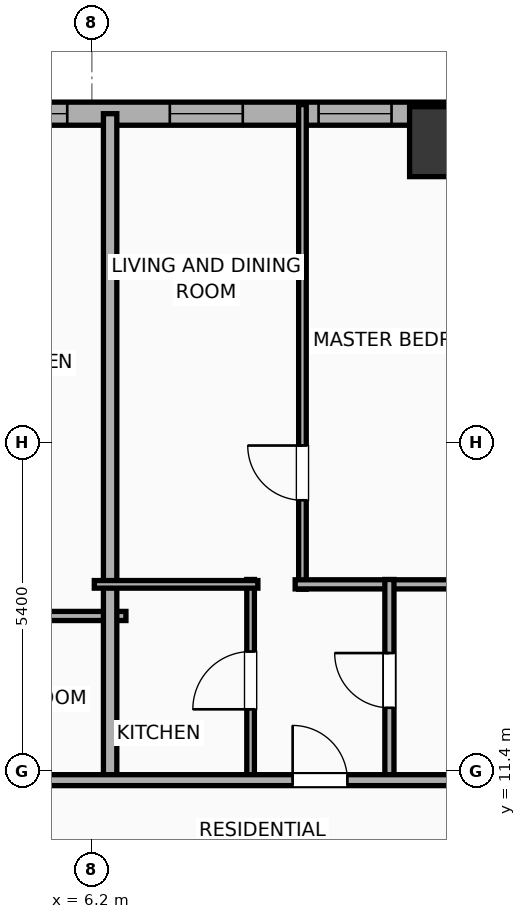
"""IFC4 building model, lengths in metres.
Left out: names, types, materials, properties, quantities, classifications, styles, units other than length and angle.
Written with IfcOpenShell. Run it as: python <this file> out.ifc"""

import sys

from ifc_helpers import new_model, si_unit, direction, frame, frame_2d, origin, origin_2d, place, context, subcontext, project, spatial, rectangle, hollow_rectangle, extrude, element, fill, save


model = new_model("IFC4")
c1 = context("Model", 3, precision=1e-05, world=origin(), true_north=direction((0.0, 1.0)))
c2 = subcontext(c1, "Body", "Model", "MODEL_VIEW")
j1 = project(units=[si_unit("LENGTHUNIT", "METRE"), si_unit("PLANEANGLEUNIT", "RADIAN")], contexts=[c1])
p1 = place(None, origin())
s1 = spatial("IfcSite", under=j1, at=p1, CompositionType="ELEMENT")
p2 = place(p1, origin())
s2 = spatial("IfcBuilding", under=s1, at=p2, CompositionType="ELEMENT")
p3 = place(p2, frame((0.0, 0.0, 76.7)))
s3 = spatial("IfcBuildingStorey", under=s2, at=p3, CompositionType="ELEMENT", Elevation=76.7)
p4 = place(p3, frame((12.0, 21.75, 0.0), z_axis=(0.0, 0.0, 1.0), x_axis=(1.0, 0.0, 0.0)))
e1 = element("IfcColumn", 1, at=p4, inside=s3, PredefinedType="COLUMN", context=c2, shape_type="SweptSolid", body=[
    extrude(hollow_rectangle(XDim=1.15, YDim=1.15, WallThickness=0.04, at=origin_2d()), origin(), (0.0, 0.0, 1.0), 3.9),
])
p5 = place(p3, frame((-29.581, 22.21, 0.0), z_axis=(0.0, 0.0, 1.0), x_axis=(1.0, 0.0, 0.0)))
e2 = element("IfcWall", 2, at=p5, inside=s3, PredefinedType="ELEMENTEDWALL", context=c2, shape_type="SweptSolid", body=[
    extrude(rectangle(XDim=51.963, YDim=0.38, at=frame_2d((25.981, 0.0))), origin(), (0.0, 0.0, 1.0), 3.6),
])
p6 = place(p5, frame((25.631, 0.0, 0.75)))
e3 = element("IfcOpeningElement", 3, at=p6, cuts=e2, PredefinedType="OPENING", context=c2, shape_type="SweptSolid", body=[
    extrude(rectangle(XDim=2.4, YDim=2.1, at=frame_2d((1.2, 1.05))), frame((0.0, 0.2, 0.0), z_axis=(0.0, -1.0, 0.0), x_axis=(1.0, 0.0, 0.0)), (0.0, 0.0, 1.0), 0.4),
])
p7 = place(p5, frame((42.952, 0.0, 0.75)))
e4 = element("IfcOpeningElement", 4, at=p7, cuts=e2, PredefinedType="OPENING", context=c2, shape_type="SweptSolid", body=[
    extrude(rectangle(XDim=2.4, YDim=2.1, at=frame_2d((1.2, 1.05))), frame((0.0, 0.2, 0.0), z_axis=(0.0, -1.0, 0.0), x_axis=(1.0, 0.0, 0.0)), (0.0, 0.0, 1.0), 0.4),
])
p8 = place(p5, frame((1.406, 0.0, 0.75)))
e5 = element("IfcOpeningElement", 5, at=p8, cuts=e2, PredefinedType="OPENING", context=c2, shape_type="SweptSolid", body=[
    extrude(rectangle(XDim=1.2, YDim=2.05, at=frame_2d((0.6, 1.025))), frame((0.0, 0.2, 0.0), z_axis=(0.0, -1.0, 0.0), x_axis=(1.0, 0.0, 0.0)), (0.0, 0.0, 1.0), 0.4),
])
p9 = place(p5, frame((4.297, 0.0, 0.75)))
e6 = element("IfcOpeningElement", 6, at=p9, cuts=e2, PredefinedType="OPENING", context=c2, shape_type="SweptSolid", body=[
    extrude(rectangle(XDim=1.2, YDim=2.05, at=frame_2d((0.6, 1.025))), frame((0.0, 0.2, 0.0), z_axis=(0.0, -1.0, 0.0), x_axis=(1.0, 0.0, 0.0)), (0.0, 0.0, 1.0), 0.4),
])
p10 = place(p5, frame((7.776, 0.0, 0.75)))
e7 = element("IfcOpeningElement", 7, at=p10, cuts=e2, PredefinedType="OPENING", context=c2, shape_type="SweptSolid", body=[
    extrude(rectangle(XDim=1.2, YDim=2.05, at=frame_2d((0.6, 1.025))), frame((0.0, 0.2, 0.0), z_axis=(0.0, -1.0, 0.0), x_axis=(1.0, 0.0, 0.0)), (0.0, 0.0, 1.0), 0.4),
])
p11 = place(p5, frame((14.036, 0.0, 0.75)))
e8 = element("IfcOpeningElement", 8, at=p11, cuts=e2, PredefinedType="OPENING", context=c2, shape_type="SweptSolid", body=[
    extrude(rectangle(XDim=1.2, YDim=2.05, at=frame_2d((0.6, 1.025))), frame((0.0, 0.2, 0.0), z_axis=(0.0, -1.0, 0.0), x_axis=(1.0, 0.0, 0.0)), (0.0, 0.0, 1.0), 0.4),
])
p12 = place(p5, frame((11.146, 0.0, 0.75)))
e9 = element("IfcOpeningElement", 9, at=p12, cuts=e2, PredefinedType="OPENING", context=c2, shape_type="SweptSolid", body=[
    extrude(rectangle(XDim=1.2, YDim=2.05, at=frame_2d((0.6, 1.025))), frame((0.0, 0.2, 0.0), z_axis=(0.0, -1.0, 0.0), x_axis=(1.0, 0.0, 0.0)), (0.0, 0.0, 1.0), 0.4),
])
p13 = place(p5, frame((18.751, 0.0, 0.75)))
e10 = element("IfcOpeningElement", 10, at=p13, cuts=e2, PredefinedType="OPENING", context=c2, shape_type="SweptSolid", body=[
    extrude(rectangle(XDim=1.2, YDim=2.05, at=frame_2d((0.6, 1.025))), frame((0.0, 0.2, 0.0), z_axis=(0.0, -1.0, 0.0), x_axis=(1.0, 0.0, 0.0)), (0.0, 0.0, 1.0), 0.4),
])
p14 = place(p5, frame((23.647, 0.0, 0.75)))
e11 = element("IfcOpeningElement", 11, at=p14, cuts=e2, PredefinedType="OPENING", context=c2, shape_type="SweptSolid", body=[
    extrude(rectangle(XDim=1.2, YDim=2.05, at=frame_2d((0.6, 1.025))), frame((0.0, 0.2, 0.0), z_axis=(0.0, -1.0, 0.0), x_axis=(1.0, 0.0, 0.0)), (0.0, 0.0, 1.0), 0.4),
])
p15 = place(p5, frame((32.006, 0.0, 0.75)))
e12 = element("IfcOpeningElement", 12, at=p15, cuts=e2, PredefinedType="OPENING", context=c2, shape_type="SweptSolid", body=[
    extrude(rectangle(XDim=1.2, YDim=2.05, at=frame_2d((0.6, 1.025))), frame((0.0, 0.2, 0.0), z_axis=(0.0, -1.0, 0.0), x_axis=(1.0, 0.0, 0.0)), (0.0, 0.0, 1.0), 0.4),
])
p16 = place(p5, frame((34.176, 0.0, 0.75)))
e13 = element("IfcOpeningElement", 13, at=p16, cuts=e2, PredefinedType="OPENING", context=c2, shape_type="SweptSolid", body=[
    extrude(rectangle(XDim=1.2, YDim=2.05, at=frame_2d((0.6, 1.025))), frame((0.0, 0.2, 0.0), z_axis=(0.0, -1.0, 0.0), x_axis=(1.0, 0.0, 0.0)), (0.0, 0.0, 1.0), 0.4),
])
p17 = place(p5, frame((37.063, 0.0, 0.75)))
e14 = element("IfcOpeningElement", 14, at=p17, cuts=e2, PredefinedType="OPENING", context=c2, shape_type="SweptSolid", body=[
    extrude(rectangle(XDim=1.2, YDim=2.05, at=frame_2d((0.6, 1.025))), frame((0.0, 0.2, 0.0), z_axis=(0.0, -1.0, 0.0), x_axis=(1.0, 0.0, 0.0)), (0.0, 0.0, 1.0), 0.4),
])
p18 = place(p5, frame((39.509, 0.0, 0.75)))
e15 = element("IfcOpeningElement", 15, at=p18, cuts=e2, PredefinedType="OPENING", context=c2, shape_type="SweptSolid", body=[
    extrude(rectangle(XDim=1.2, YDim=2.05, at=frame_2d((0.6, 1.025))), frame((0.0, 0.2, 0.0), z_axis=(0.0, -1.0, 0.0), x_axis=(1.0, 0.0, 0.0)), (0.0, 0.0, 1.0), 0.4),
])
p19 = place(p5, frame((46.921, 0.0, 0.75)))
e16 = element("IfcOpeningElement", 16, at=p19, cuts=e2, PredefinedType="OPENING", context=c2, shape_type="SweptSolid", body=[
    extrude(rectangle(XDim=1.2, YDim=2.05, at=frame_2d((0.6, 1.025))), frame((0.0, 0.2, 0.0), z_axis=(0.0, -1.0, 0.0), x_axis=(1.0, 0.0, 0.0)), (0.0, 0.0, 1.0), 0.4),
])
p20 = place(p5, frame((49.55, 0.0, 0.75)))
e17 = element("IfcOpeningElement", 17, at=p20, cuts=e2, PredefinedType="OPENING", context=c2, shape_type="SweptSolid", body=[
    extrude(rectangle(XDim=1.2, YDim=2.05, at=frame_2d((0.6, 1.025))), frame((0.0, 0.2, 0.0), z_axis=(0.0, -1.0, 0.0), x_axis=(1.0, 0.0, 0.0)), (0.0, 0.0, 1.0), 0.4),
])
p21 = place(p3, frame((3.81, 13.95, 0.0), z_axis=(0.0, 0.0, 1.0), x_axis=(1.0, 0.0, 0.0)))
e18 = element("IfcWall", 18, at=p21, inside=s3, PredefinedType="PLUMBINGWALL", context=c2, shape_type="SweptSolid", body=[
    extrude(rectangle(XDim=2.95, YDim=0.15, at=frame_2d((1.475, 0.0))), origin(), (0.0, 0.0, 1.0), 3.6),
])
p22 = place(p3, frame((6.5, 11.17, 0.0), z_axis=(0.0, 0.0, 1.0), x_axis=(0.0, 1.0, 0.0)))
e19 = element("IfcWall", 19, at=p22, inside=s3, PredefinedType="PARTITIONING", context=c2, shape_type="SweptSolid", body=[
    extrude(rectangle(XDim=11.04, YDim=0.22, at=frame_2d((5.52, 0.0))), origin(), (0.0, 0.0, 1.0), 3.6),
])
p23 = place(p3, frame((9.663, 14.39, 0.0), z_axis=(0.0, 0.0, 1.0), x_axis=(0.0, 1.0, 0.0)))
e20 = element("IfcWall", 20, at=p23, inside=s3, PredefinedType="PARTITIONING", context=c2, shape_type="SweptSolid", body=[
    extrude(rectangle(XDim=7.97, YDim=0.125, at=frame_2d((3.985, 0.0))), origin(), (0.0, 0.0, 1.0), 3.6),
])
p24 = place(p23, frame((1.463, 0.0, 0.0)))
e21 = element("IfcOpeningElement", 21, at=p24, cuts=e20, PredefinedType="OPENING", context=c2, shape_type="SweptSolid", body=[
    extrude(rectangle(XDim=0.9, YDim=2.05, at=frame_2d((0.45, 1.025))), frame((0.0, 0.073, 0.0), z_axis=(0.0, -1.0, 0.0), x_axis=(1.0, 0.0, 0.0)), (0.0, 0.0, 1.0), 0.145),
])
p25 = place(p3, frame((9.543, 14.47, 0.0), z_axis=(0.0, 0.0, 1.0), x_axis=(1.0, 0.0, 0.0)))
e22 = element("IfcWall", 22, at=p25, inside=s3, PredefinedType="PLUMBINGWALL", context=c2, shape_type="SweptSolid", body=[
    extrude(rectangle(XDim=3.605, YDim=0.15, at=frame_2d((1.802, 0.0))), origin(), (0.0, 0.0, 1.0), 3.6),
])
p26 = place(p3, frame((8.81, 11.23, 0.0), z_axis=(0.0, 0.0, 1.0), x_axis=(0.0, 1.0, 0.0)))
e23 = element("IfcWall", 23, at=p26, inside=s3, PredefinedType="PARTITIONING", context=c2, shape_type="SweptSolid", body=[
    extrude(rectangle(XDim=3.32, YDim=0.125, at=frame_2d((1.66, 0.0))), origin(), (0.0, 0.0, 1.0), 3.6),
])
p27 = place(p26, frame((1.185, 0.0, 0.0)))
e24 = element("IfcOpeningElement", 24, at=p27, cuts=e23, PredefinedType="OPENING", context=c2, shape_type="SweptSolid", body=[
    extrude(rectangle(XDim=0.95, YDim=2.05, at=frame_2d((0.475, 1.025))), frame((0.0, 0.073, 0.0), z_axis=(0.0, -1.0, 0.0), x_axis=(1.0, 0.0, 0.0)), (0.0, 0.0, 1.0), 0.145),
])
p28 = place(p3, frame((6.24, 14.47, 0.0), z_axis=(0.0, 0.0, 1.0), x_axis=(1.0, 0.0, 0.0)))
e25 = element("IfcWall", 25, at=p28, inside=s3, PredefinedType="PARTITIONING", context=c2, shape_type="SweptSolid", body=[
    extrude(rectangle(XDim=2.69, YDim=0.125, at=frame_2d((1.345, 0.0))), origin(), (0.0, 0.0, 1.0), 3.6),
])
p29 = place(p3, frame((11.093, 11.23, 0.0), z_axis=(0.0, 0.0, 1.0), x_axis=(0.0, 1.0, 0.0)))
e26 = element("IfcWall", 26, at=p29, inside=s3, PredefinedType="PLUMBINGWALL", context=c2, shape_type="SweptSolid", body=[
    extrude(rectangle(XDim=3.32, YDim=0.15, at=frame_2d((1.66, 0.0))), origin(), (0.0, 0.0, 1.0), 3.6),
])
p30 = place(p29, frame((1.21, 0.0, 0.0)))
e27 = element("IfcOpeningElement", 27, at=p30, cuts=e26, PredefinedType="OPENING", context=c2, shape_type="SweptSolid", body=[
    extrude(rectangle(XDim=0.9, YDim=2.05, at=frame_2d((0.45, 1.025))), frame((0.0, 0.085, 0.0), z_axis=(0.0, -1.0, 0.0), x_axis=(1.0, 0.0, 0.0)), (0.0, 0.0, 1.0), 0.17),
])
p31 = place(p3, frame((-33.41, 11.25, 0.0), z_axis=(0.0, 0.0, 1.0), x_axis=(1.0, 0.0, 0.0)))
e28 = element("IfcWall", 28, at=p31, inside=s3, PredefinedType="PARTITIONING", context=c2, shape_type="SweptSolid", body=[
    extrude(rectangle(XDim=59.62, YDim=0.18, at=frame_2d((29.81, 0.0))), origin(), (0.0, 0.0, 1.0), 3.6),
])
p32 = place(p31, frame((3.157, 0.0, 0.0)))
e29 = element("IfcOpeningElement", 29, at=p32, cuts=e28, PredefinedType="OPENING", context=c2, shape_type="SweptSolid", body=[
    extrude(rectangle(XDim=0.9, YDim=2.05, at=frame_2d((0.45, 1.025))), frame((0.0, 0.1, 0.0), z_axis=(0.0, -1.0, 0.0), x_axis=(1.0, 0.0, 0.0)), (0.0, 0.0, 1.0), 0.2),
])
p33 = place(p31, frame((10.145, 0.0, 0.0)))
e30 = element("IfcOpeningElement", 30, at=p33, cuts=e28, PredefinedType="OPENING", context=c2, shape_type="SweptSolid", body=[
    extrude(rectangle(XDim=0.9, YDim=2.05, at=frame_2d((0.45, 1.025))), frame((0.0, 0.1, 0.0), z_axis=(0.0, -1.0, 0.0), x_axis=(1.0, 0.0, 0.0)), (0.0, 0.0, 1.0), 0.2),
])
p34 = place(p31, frame((17.86, 0.0, 0.0)))
e31 = element("IfcOpeningElement", 31, at=p34, cuts=e28, PredefinedType="OPENING", context=c2, shape_type="SweptSolid", body=[
    extrude(rectangle(XDim=1.15, YDim=2.05, at=frame_2d((0.575, 1.025))), frame((0.0, 0.1, 0.0), z_axis=(0.0, -1.0, 0.0), x_axis=(1.0, 0.0, 0.0)), (0.0, 0.0, 1.0), 0.2),
])
p35 = place(p31, frame((23.338, 0.0, 0.0)))
e32 = element("IfcOpeningElement", 32, at=p35, cuts=e28, PredefinedType="OPENING", context=c2, shape_type="SweptSolid", body=[
    extrude(rectangle(XDim=0.9, YDim=2.05, at=frame_2d((0.45, 1.025))), frame((0.0, 0.1, 0.0), z_axis=(0.0, -1.0, 0.0), x_axis=(1.0, 0.0, 0.0)), (0.0, 0.0, 1.0), 0.2),
])
p36 = place(p31, frame((30.719, 0.0, 0.0)))
e33 = element("IfcOpeningElement", 33, at=p36, cuts=e28, PredefinedType="OPENING", context=c2, shape_type="SweptSolid", body=[
    extrude(rectangle(XDim=1.15, YDim=2.05, at=frame_2d((0.575, 1.025))), frame((0.0, 0.1, 0.0), z_axis=(0.0, -1.0, 0.0), x_axis=(1.0, 0.0, 0.0)), (0.0, 0.0, 1.0), 0.2),
])
p37 = place(p31, frame((34.81, 0.0, 0.0)))
e34 = element("IfcOpeningElement", 34, at=p37, cuts=e28, PredefinedType="OPENING", context=c2, shape_type="SweptSolid", body=[
    extrude(rectangle(XDim=1.15, YDim=2.05, at=frame_2d((0.575, 1.025))), frame((0.0, 0.1, 0.0), z_axis=(0.0, -1.0, 0.0), x_axis=(1.0, 0.0, 0.0)), (0.0, 0.0, 1.0), 0.2),
])
p38 = place(p31, frame((42.912, 0.0, 0.0)))
e35 = element("IfcOpeningElement", 35, at=p38, cuts=e28, PredefinedType="OPENING", context=c2, shape_type="SweptSolid", body=[
    extrude(rectangle(XDim=0.9, YDim=2.05, at=frame_2d((0.45, 1.025))), frame((0.0, 0.1, 0.0), z_axis=(0.0, -1.0, 0.0), x_axis=(1.0, 0.0, 0.0)), (0.0, 0.0, 1.0), 0.2),
])
p39 = place(p31, frame((49.482, 0.0, 0.0)))
e36 = element("IfcOpeningElement", 36, at=p39, cuts=e28, PredefinedType="OPENING", context=c2, shape_type="SweptSolid", body=[
    extrude(rectangle(XDim=0.9, YDim=2.05, at=frame_2d((0.45, 1.025))), frame((0.0, 0.1, 0.0), z_axis=(0.0, -1.0, 0.0), x_axis=(1.0, 0.0, 0.0)), (0.0, 0.0, 1.0), 0.2),
])
p40 = place(p31, frame((56.088, 0.0, 0.0)))
e37 = element("IfcOpeningElement", 37, at=p40, cuts=e28, PredefinedType="OPENING", context=c2, shape_type="SweptSolid", body=[
    extrude(rectangle(XDim=0.9, YDim=2.05, at=frame_2d((0.45, 1.025))), frame((0.0, 0.1, 0.0), z_axis=(0.0, -1.0, 0.0), x_axis=(1.0, 0.0, 0.0)), (0.0, 0.0, 1.0), 0.2),
])
p41 = place(p16, origin())
e38 = element("IfcWindow", 38, at=p41, inside=s3, PartitioningType="SINGLE_PANEL", PredefinedType="WINDOW", context=c2, shape_type="SweptSolid", body=[
    extrude(rectangle(XDim=1.2, YDim=2.05, at=frame_2d((0.6, 1.025))), frame((0.0, 0.03, 0.0), z_axis=(0.0, -1.0, 0.0), x_axis=(1.0, 0.0, 0.0)), (0.0, 0.0, 1.0), 0.06),
])
fill(e13, e38)
p42 = place(p17, origin())
e39 = element("IfcWindow", 39, at=p42, inside=s3, PartitioningType="SINGLE_PANEL", PredefinedType="WINDOW", context=c2, shape_type="SweptSolid", body=[
    extrude(rectangle(XDim=1.2, YDim=2.05, at=frame_2d((0.6, 1.025))), frame((0.0, 0.03, 0.0), z_axis=(0.0, -1.0, 0.0), x_axis=(1.0, 0.0, 0.0)), (0.0, 0.0, 1.0), 0.06),
])
fill(e14, e39)
p43 = place(p18, origin())
e40 = element("IfcWindow", 40, at=p43, inside=s3, PartitioningType="SINGLE_PANEL", PredefinedType="WINDOW", context=c2, shape_type="SweptSolid", body=[
    extrude(rectangle(XDim=1.2, YDim=2.05, at=frame_2d((0.6, 1.025))), frame((0.0, 0.03, 0.0), z_axis=(0.0, -1.0, 0.0), x_axis=(1.0, 0.0, 0.0)), (0.0, 0.0, 1.0), 0.06),
])
fill(e15, e40)
p44 = place(p24, origin())
e41 = element("IfcDoor", 41, at=p44, inside=s3, OperationType="SINGLE_SWING_RIGHT", PredefinedType="DOOR", context=c2, shape_type="SweptSolid", body=[
    extrude(rectangle(XDim=0.9, YDim=2.05, at=frame_2d((0.45, 1.025))), frame((0.0, 0.025, 0.0), z_axis=(0.0, -1.0, 0.0), x_axis=(1.0, 0.0, 0.0)), (0.0, 0.0, 1.0), 0.05),
])
fill(e21, e41)
p45 = place(p27, origin())
e42 = element("IfcDoor", 42, at=p45, inside=s3, OperationType="SINGLE_SWING_LEFT", PredefinedType="DOOR", context=c2, shape_type="SweptSolid", body=[
    extrude(rectangle(XDim=0.95, YDim=2.05, at=frame_2d((0.475, 1.025))), frame((0.0, 0.025, 0.0), z_axis=(0.0, -1.0, 0.0), x_axis=(1.0, 0.0, 0.0)), (0.0, 0.0, 1.0), 0.05),
])
fill(e24, e42)
p46 = place(p30, origin())
e43 = element("IfcDoor", 43, at=p46, inside=s3, OperationType="SINGLE_SWING_RIGHT", PredefinedType="DOOR", context=c2, shape_type="SweptSolid", body=[
    extrude(rectangle(XDim=0.9, YDim=2.05, at=frame_2d((0.45, 1.025))), frame((0.0, 0.025, 0.0), z_axis=(0.0, -1.0, 0.0), x_axis=(1.0, 0.0, 0.0)), (0.0, 0.0, 1.0), 0.05),
])
fill(e27, e43)
p47 = place(p38, origin())
e44 = element("IfcDoor", 44, at=p47, inside=s3, OperationType="SINGLE_SWING_LEFT", PredefinedType="DOOR", context=c2, shape_type="SweptSolid", body=[
    extrude(rectangle(XDim=0.9, YDim=2.05, at=frame_2d((0.45, 1.025))), frame((0.0, 0.025, 0.0), z_axis=(0.0, -1.0, 0.0), x_axis=(1.0, 0.0, 0.0)), (0.0, 0.0, 1.0), 0.05),
])
fill(e35, e44)
save(model, sys.argv[1])
